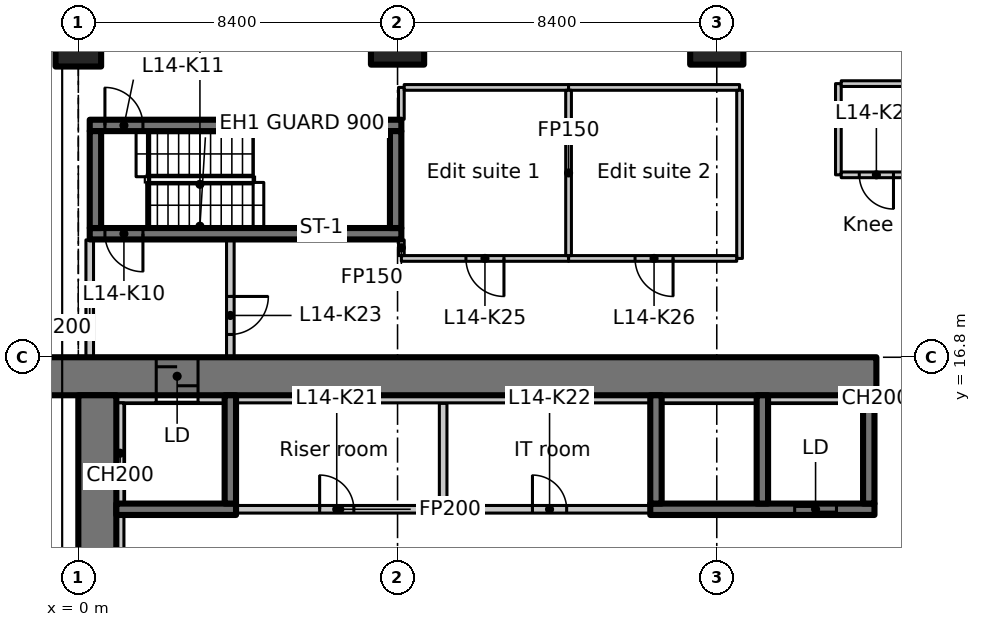
"""IFC4 building model, lengths in metres.
Left out: names, types, materials, properties, quantities, classifications, styles, units other than length and angle.
Written with IfcOpenShell. Run it as: python <this file> out.ifc"""

import sys

from ifc_helpers import new_model, si_unit, direction, frame, frame_2d, origin, origin_2d, place, context, subcontext, project, spatial, rectangle, extrude, element, fill, save


model = new_model("IFC4")
c1 = context("Model", 3, precision=1e-05, world=origin(), true_north=direction((0.0, 1.0)))
c2 = subcontext(c1, "Body", "Model", "MODEL_VIEW")
j1 = project(units=[si_unit("LENGTHUNIT", "METRE"), si_unit("PLANEANGLEUNIT", "RADIAN")], contexts=[c1])
p1 = place(None, origin())
s1 = spatial("IfcSite", under=j1, at=p1, CompositionType="ELEMENT")
p2 = place(p1, origin())
s2 = spatial("IfcBuilding", under=s1, at=p2, CompositionType="ELEMENT")
p3 = place(p2, frame((0.0, 0.0, 65.3)))
s3 = spatial("IfcBuildingStorey", under=s2, at=p3, CompositionType="ELEMENT", Elevation=65.3)
p4 = place(p3, frame((0.0, 25.2, 0.0), z_axis=(0.0, 0.0, 1.0), x_axis=(1.0, 0.0, 0.0)))
e1 = element("IfcColumn", 1, at=p4, inside=s3, PredefinedType="COLUMN", context=c2, shape_type="SweptSolid", body=[
    extrude(rectangle(XDim=1.2, YDim=1.5, at=origin_2d()), origin(), (0.0, 0.0, 1.0), 3.35),
])
for number, where, z_axis, x_axis in (
    (2, (8.4, 25.2, 0.0), (0.0, 0.0, 1.0), (1.0, 0.0, 0.0)),
    (3, (16.8, 25.2, 0.0), (0.0, 0.0, 1.0), (1.0, 0.0, 0.0)),
):
    element("IfcColumn", number, at=place(p3, frame(where, z_axis=z_axis, x_axis=x_axis)), inside=s3, PredefinedType="COLUMN", context=c2, shape_type="SweptSolid", body=[
        extrude(rectangle(XDim=1.4, YDim=1.4, at=origin_2d()), origin(), (0.0, 0.0, 1.0), 3.35),
    ])
p5 = place(p3, frame((-1.1, 16.3, 0.0), z_axis=(0.0, 0.0, 1.0), x_axis=(1.0, 0.0, 0.0)))
e4 = element("IfcWall", 4, at=p5, inside=s3, PredefinedType="SHEAR", context=c2, shape_type="SweptSolid", body=[
    extrude(rectangle(XDim=22.1, YDim=1.0, at=frame_2d((11.05, 0.0))), origin(), (0.0, 0.0, 1.0), 3.35),
])
p6 = place(p5, frame((3.15, 0.0, 0.0)))
e5 = element("IfcOpeningElement", 5, at=p6, cuts=e4, PredefinedType="OPENING", context=c2, shape_type="SweptSolid", body=[
    extrude(rectangle(XDim=1.1, YDim=2.3, at=frame_2d((0.55, 1.15))), frame((0.0, 0.51, 0.0), z_axis=(0.0, -1.0, 0.0), x_axis=(1.0, 0.0, 0.0)), (0.0, 0.0, 1.0), 1.02),
])
p7 = place(p3, frame((0.5, 6.936, 0.0), z_axis=(0.0, 0.0, 1.0), x_axis=(0.0, 1.0, 0.0)))
e6 = element("IfcWall", 6, at=p7, inside=s3, PredefinedType="SHEAR", context=c2, shape_type="SweptSolid", body=[
    extrude(rectangle(XDim=8.864, YDim=1.0, at=frame_2d((4.432, 0.0))), origin(), (0.0, 0.0, 1.0), 3.35),
])
p8 = place(p3, frame((1.0, 15.7, 0.0), z_axis=(0.0, 0.0, 1.0), x_axis=(1.0, 0.0, 0.0)))
e7 = element("IfcWall", 7, at=p8, inside=s3, PredefinedType="PARTITIONING", context=c2, shape_type="SweptSolid", body=[
    extrude(rectangle(XDim=1.05, YDim=0.2, at=frame_2d((0.525, 0.0))), origin(), (0.0, 0.0, 1.0), 3.35),
])
p9 = place(p3, frame((1.0, 12.8, 0.0), z_axis=(0.0, 0.0, 1.0), x_axis=(1.0, 0.0, 0.0)))
e8 = element("IfcWall", 8, at=p9, inside=s3, PredefinedType="SHEAR", context=c2, shape_type="SweptSolid", body=[
    extrude(rectangle(XDim=3.15, YDim=0.3, at=frame_2d((1.575, 0.0))), origin(), (0.0, 0.0, 1.0), 3.35),
])
p10 = place(p3, frame((4.0, 12.95, 0.0), z_axis=(0.0, 0.0, 1.0), x_axis=(0.0, 1.0, 0.0)))
e9 = element("IfcWall", 9, at=p10, inside=s3, PredefinedType="SHEAR", context=c2, shape_type="SweptSolid", body=[
    extrude(rectangle(XDim=2.85, YDim=0.3, at=frame_2d((1.425, 0.0))), origin(), (0.0, 0.0, 1.0), 3.35),
])
p11 = place(p3, frame((15.05, 12.8, 0.0), z_axis=(0.0, 0.0, 1.0), x_axis=(1.0, 0.0, 0.0)))
e10 = element("IfcWall", 10, at=p11, inside=s3, PredefinedType="SHEAR", context=c2, shape_type="SweptSolid", body=[
    extrude(rectangle(XDim=5.9, YDim=0.3, at=frame_2d((2.95, 0.0))), origin(), (0.0, 0.0, 1.0), 3.35),
])
p12 = place(p11, frame((3.8, 0.0, 0.0)))
e11 = element("IfcOpeningElement", 11, at=p12, cuts=e10, PredefinedType="OPENING", context=c2, shape_type="SweptSolid", body=[
    extrude(rectangle(XDim=1.1, YDim=2.3, at=frame_2d((0.55, 1.15))), frame((0.0, 0.16, 0.0), z_axis=(0.0, -1.0, 0.0), x_axis=(1.0, 0.0, 0.0)), (0.0, 0.0, 1.0), 0.32),
])
for number, where, z_axis, x_axis in (
    (12, (15.2, 12.95, 0.0), (0.0, 0.0, 1.0), (0.0, 1.0, 0.0)),
    (13, (18.0, 12.95, 0.0), (0.0, 0.0, 1.0), (0.0, 1.0, 0.0)),
    (14, (20.8, 12.95, 0.0), (0.0, 0.0, 1.0), (0.0, 1.0, 0.0)),
):
    element("IfcWall", number, at=place(p3, frame(where, z_axis=z_axis, x_axis=x_axis)), inside=s3, PredefinedType="SHEAR", context=c2, shape_type="SweptSolid", body=[
        extrude(rectangle(XDim=2.85, YDim=0.3, at=frame_2d((1.425, 0.0))), origin(), (0.0, 0.0, 1.0), 3.35),
    ])
p13 = place(p3, frame((8.5, 20.05, 0.0), z_axis=(0.0, 0.0, 1.0), x_axis=(-1.0, 0.0, 0.0)))
e15 = element("IfcWall", 15, at=p13, inside=s3, PredefinedType="SHEAR", context=c2, shape_type="SweptSolid", body=[
    extrude(rectangle(XDim=8.2, YDim=0.3, at=frame_2d((4.1, 0.0))), origin(), (0.0, 0.0, 1.0), 3.35),
])
p14 = place(p13, frame((6.8, 0.0, 0.0)))
e16 = element("IfcOpeningElement", 16, at=p14, cuts=e15, PredefinedType="OPENING", context=c2, shape_type="SweptSolid", body=[
    extrude(rectangle(XDim=1.0, YDim=2.1, at=frame_2d((0.5, 1.05))), frame((0.0, 0.16, 0.0), z_axis=(0.0, -1.0, 0.0), x_axis=(1.0, 0.0, 0.0)), (0.0, 0.0, 1.0), 0.32),
])
p15 = place(p3, frame((0.3, 22.9, 0.0), z_axis=(0.0, 0.0, 1.0), x_axis=(1.0, 0.0, 0.0)))
e17 = element("IfcWall", 17, at=p15, inside=s3, PredefinedType="SHEAR", context=c2, shape_type="SweptSolid", body=[
    extrude(rectangle(XDim=8.2, YDim=0.3, at=frame_2d((4.1, 0.0))), origin(), (0.0, 0.0, 1.0), 3.35),
])
p16 = place(p15, frame((0.4, 0.0, 0.0)))
e18 = element("IfcOpeningElement", 18, at=p16, cuts=e17, PredefinedType="OPENING", context=c2, shape_type="SweptSolid", body=[
    extrude(rectangle(XDim=1.0, YDim=2.1, at=frame_2d((0.5, 1.05))), frame((0.0, 0.16, 0.0), z_axis=(0.0, -1.0, 0.0), x_axis=(1.0, 0.0, 0.0)), (0.0, 0.0, 1.0), 0.32),
])
for number, where, z_axis, x_axis in (
    (19, (0.45, 20.2, 0.0), (0.0, 0.0, 1.0), (0.0, 1.0, 0.0)),
    (20, (8.35, 20.2, 0.0), (0.0, 0.0, 1.0), (0.0, 1.0, 0.0)),
):
    element("IfcWall", number, at=place(p3, frame(where, z_axis=z_axis, x_axis=x_axis)), inside=s3, PredefinedType="SHEAR", context=c2, shape_type="SweptSolid", body=[
        extrude(rectangle(XDim=2.55, YDim=0.3, at=frame_2d((1.275, 0.0))), origin(), (0.0, 0.0, 1.0), 3.35),
    ])
p17 = place(p3, frame((0.3, 16.812, 0.0), z_axis=(0.0, 0.0, 1.0), x_axis=(0.0, 1.0, 0.0)))
e21 = element("IfcWall", 21, at=p17, inside=s3, PredefinedType="PARTITIONING", context=c2, shape_type="SweptSolid", body=[
    extrude(rectangle(XDim=3.076, YDim=0.2, at=frame_2d((1.538, 0.0))), origin(), (0.0, 0.0, 1.0), 2.98),
])
p18 = place(p3, frame((4.0, 19.888, 0.0), z_axis=(0.0, 0.0, 1.0), x_axis=(0.0, -1.0, 0.0)))
e22 = element("IfcWall", 22, at=p18, inside=s3, PredefinedType="PARTITIONING", context=c2, shape_type="SweptSolid", body=[
    extrude(rectangle(XDim=3.076, YDim=0.2, at=frame_2d((1.538, 0.0))), origin(), (0.0, 0.0, 1.0), 3.35),
])
p19 = place(p18, frame((1.488, 0.0, 0.0)))
e23 = element("IfcOpeningElement", 23, at=p19, cuts=e22, PredefinedType="OPENING", context=c2, shape_type="SweptSolid", body=[
    extrude(rectangle(XDim=1.0, YDim=2.1, at=frame_2d((0.5, 1.05))), frame((0.0, 0.11, 0.0), z_axis=(0.0, -1.0, 0.0), x_axis=(1.0, 0.0, 0.0)), (0.0, 0.0, 1.0), 0.22),
])
p20 = place(p3, frame((4.162, 12.8, 0.0), z_axis=(0.0, 0.0, 1.0), x_axis=(1.0, 0.0, 0.0)))
e24 = element("IfcWall", 24, at=p20, inside=s3, PredefinedType="PARTITIONING", context=c2, shape_type="SweptSolid", body=[
    extrude(rectangle(XDim=5.438, YDim=0.2, at=frame_2d((2.719, 0.0))), origin(), (0.0, 0.0, 1.0), 3.35),
])
p21 = place(p20, frame((2.188, 0.0, 0.0)))
e25 = element("IfcOpeningElement", 25, at=p21, cuts=e24, PredefinedType="OPENING", context=c2, shape_type="SweptSolid", body=[
    extrude(rectangle(XDim=0.9, YDim=2.1, at=frame_2d((0.45, 1.05))), frame((0.0, 0.11, 0.0), z_axis=(0.0, -1.0, 0.0), x_axis=(1.0, 0.0, 0.0)), (0.0, 0.0, 1.0), 0.22),
])
p22 = place(p3, frame((9.6, 12.8, 0.0), z_axis=(0.0, 0.0, 1.0), x_axis=(1.0, 0.0, 0.0)))
e26 = element("IfcWall", 26, at=p22, inside=s3, PredefinedType="PARTITIONING", context=c2, shape_type="SweptSolid", body=[
    extrude(rectangle(XDim=5.438, YDim=0.2, at=frame_2d((2.719, 0.0))), origin(), (0.0, 0.0, 1.0), 3.35),
])
p23 = place(p22, frame((2.35, 0.0, 0.0)))
e27 = element("IfcOpeningElement", 27, at=p23, cuts=e26, PredefinedType="OPENING", context=c2, shape_type="SweptSolid", body=[
    extrude(rectangle(XDim=0.9, YDim=2.1, at=frame_2d((0.45, 1.05))), frame((0.0, 0.11, 0.0), z_axis=(0.0, -1.0, 0.0), x_axis=(1.0, 0.0, 0.0)), (0.0, 0.0, 1.0), 0.22),
])
p24 = place(p3, frame((9.6, 15.588, 0.0), z_axis=(0.0, 0.0, 1.0), x_axis=(0.0, -1.0, 0.0)))
e28 = element("IfcWall", 28, at=p24, inside=s3, PredefinedType="PARTITIONING", context=c2, shape_type="SweptSolid", body=[
    extrude(rectangle(XDim=2.688, YDim=0.2, at=frame_2d((1.344, 0.0))), origin(), (0.0, 0.0, 1.0), 3.35),
])
p25 = place(p3, frame((12.9, 19.4, 0.0), z_axis=(0.0, 0.0, 1.0), x_axis=(-1.0, 0.0, 0.0)))
e29 = element("IfcWall", 29, at=p25, inside=s3, PredefinedType="PARTITIONING", context=c2, shape_type="SweptSolid", body=[
    extrude(rectangle(XDim=4.4, YDim=0.15, at=frame_2d((2.2, 0.0))), origin(), (0.0, 0.0, 1.0), 3.35),
])
p26 = place(p25, frame((1.7, 0.0, 0.0)))
e30 = element("IfcOpeningElement", 30, at=p26, cuts=e29, PredefinedType="OPENING", context=c2, shape_type="SweptSolid", body=[
    extrude(rectangle(XDim=1.0, YDim=2.1, at=frame_2d((0.5, 1.05))), frame((0.0, 0.085, 0.0), z_axis=(0.0, -1.0, 0.0), x_axis=(1.0, 0.0, 0.0)), (0.0, 0.0, 1.0), 0.17),
])
p27 = place(p3, frame((8.5, 19.475, 0.0), z_axis=(0.0, 0.0, 1.0), x_axis=(0.0, 1.0, 0.0)))
e31 = element("IfcWall", 31, at=p27, inside=s3, PredefinedType="PARTITIONING", context=c2, shape_type="SweptSolid", body=[
    extrude(rectangle(XDim=0.413, YDim=0.15, at=frame_2d((0.207, 0.0))), origin(), (0.0, 0.0, 1.0), 3.35),
])
p28 = place(p3, frame((8.5, 23.062, 0.0), z_axis=(0.0, 0.0, 1.0), x_axis=(0.0, 1.0, 0.0)))
e32 = element("IfcWall", 32, at=p28, inside=s3, PredefinedType="PARTITIONING", context=c2, shape_type="SweptSolid", body=[
    extrude(rectangle(XDim=0.838, YDim=0.15, at=frame_2d((0.419, 0.0))), origin(), (0.0, 0.0, 1.0), 3.35),
])
p29 = place(p3, frame((8.575, 23.9, 0.0), z_axis=(0.0, 0.0, 1.0), x_axis=(1.0, 0.0, 0.0)))
e33 = element("IfcWall", 33, at=p29, inside=s3, PredefinedType="PARTITIONING", context=c2, shape_type="SweptSolid", body=[
    extrude(rectangle(XDim=4.325, YDim=0.15, at=frame_2d((2.163, 0.0))), origin(), (0.0, 0.0, 1.0), 3.35),
])
p30 = place(p3, frame((12.9, 23.9, 0.0), z_axis=(0.0, 0.0, 1.0), x_axis=(1.0, 0.0, 0.0)))
e34 = element("IfcWall", 34, at=p30, inside=s3, PredefinedType="PARTITIONING", context=c2, shape_type="SweptSolid", body=[
    extrude(rectangle(XDim=4.5, YDim=0.15, at=frame_2d((2.25, 0.0))), origin(), (0.0, 0.0, 1.0), 3.35),
])
p31 = place(p3, frame((17.4, 23.825, 0.0), z_axis=(0.0, 0.0, 1.0), x_axis=(0.0, -1.0, 0.0)))
e35 = element("IfcWall", 35, at=p31, inside=s3, PredefinedType="PARTITIONING", context=c2, shape_type="SweptSolid", body=[
    extrude(rectangle(XDim=4.425, YDim=0.15, at=frame_2d((2.212, 0.0))), origin(), (0.0, 0.0, 1.0), 3.35),
])
p32 = place(p3, frame((17.325, 19.4, 0.0), z_axis=(0.0, 0.0, 1.0), x_axis=(-1.0, 0.0, 0.0)))
e36 = element("IfcWall", 36, at=p32, inside=s3, PredefinedType="PARTITIONING", context=c2, shape_type="SweptSolid", body=[
    extrude(rectangle(XDim=4.425, YDim=0.15, at=frame_2d((2.212, 0.0))), origin(), (0.0, 0.0, 1.0), 3.35),
])
p33 = place(p32, frame((1.675, 0.0, 0.0)))
e37 = element("IfcOpeningElement", 37, at=p33, cuts=e36, PredefinedType="OPENING", context=c2, shape_type="SweptSolid", body=[
    extrude(rectangle(XDim=1.0, YDim=2.1, at=frame_2d((0.5, 1.05))), frame((0.0, 0.085, 0.0), z_axis=(0.0, -1.0, 0.0), x_axis=(1.0, 0.0, 0.0)), (0.0, 0.0, 1.0), 0.17),
])
p34 = place(p3, frame((12.9, 23.825, 0.0), z_axis=(0.0, 0.0, 1.0), x_axis=(0.0, -1.0, 0.0)))
e38 = element("IfcWall", 38, at=p34, inside=s3, PredefinedType="PARTITIONING", context=c2, shape_type="SweptSolid", body=[
    extrude(rectangle(XDim=4.35, YDim=0.15, at=frame_2d((2.175, 0.0))), origin(), (0.0, 0.0, 1.0), 3.35),
])
p35 = place(p3, frame((20.0, 21.6, 0.0), z_axis=(0.0, 0.0, 1.0), x_axis=(0.0, 1.0, 0.0)))
e39 = element("IfcWall", 39, at=p35, inside=s3, PredefinedType="PARTITIONING", context=c2, shape_type="SweptSolid", body=[
    extrude(rectangle(XDim=2.4, YDim=0.15, at=frame_2d((1.2, 0.0))), origin(), (0.0, 0.0, 1.0), 3.35),
])
p36 = place(p3, frame((20.075, 24.0, 0.0), z_axis=(0.0, 0.0, 1.0), x_axis=(1.0, 0.0, 0.0)))
e40 = element("IfcWall", 40, at=p36, inside=s3, PredefinedType="PARTITIONING", context=c2, shape_type="SweptSolid", body=[
    extrude(rectangle(XDim=1.925, YDim=0.15, at=frame_2d((0.962, 0.0))), origin(), (0.0, 0.0, 1.0), 3.35),
])
p37 = place(p3, frame((21.925, 21.6, 0.0), z_axis=(0.0, 0.0, 1.0), x_axis=(-1.0, 0.0, 0.0)))
e41 = element("IfcWall", 41, at=p37, inside=s3, PredefinedType="PARTITIONING", context=c2, shape_type="SweptSolid", body=[
    extrude(rectangle(XDim=1.85, YDim=0.15, at=frame_2d((0.925, 0.0))), origin(), (0.0, 0.0, 1.0), 3.35),
])
p38 = place(p37, frame((0.475, 0.0, 0.0)))
e42 = element("IfcOpeningElement", 42, at=p38, cuts=e41, PredefinedType="OPENING", context=c2, shape_type="SweptSolid", body=[
    extrude(rectangle(XDim=0.9, YDim=2.1, at=frame_2d((0.45, 1.05))), frame((0.0, 0.085, 0.0), z_axis=(0.0, -1.0, 0.0), x_axis=(1.0, 0.0, 0.0)), (0.0, 0.0, 1.0), 0.17),
])
p39 = place(p3, frame((1.1, 9.75, 0.0), z_axis=(0.0, 0.0, 1.0), x_axis=(0.0, 1.0, 0.0)))
e43 = element("IfcWall", 43, at=p39, inside=s3, PredefinedType="PARTITIONING", context=c2, shape_type="SweptSolid", body=[
    extrude(rectangle(XDim=2.9, YDim=0.2, at=frame_2d((1.45, 0.0))), origin(), (0.0, 0.0, 1.0), 3.35),
])
p40 = place(p3, frame((1.1, 12.95, 0.0), z_axis=(0.0, 0.0, 1.0), x_axis=(0.0, 1.0, 0.0)))
e44 = element("IfcWall", 44, at=p40, inside=s3, PredefinedType="PARTITIONING", context=c2, shape_type="SweptSolid", body=[
    extrude(rectangle(XDim=2.65, YDim=0.2, at=frame_2d((1.325, 0.0))), origin(), (0.0, 0.0, 1.0), 3.35),
])
p41 = place(p3, frame((3.15, 15.7, 0.0), z_axis=(0.0, 0.0, 1.0), x_axis=(1.0, 0.0, 0.0)))
e45 = element("IfcWall", 45, at=p41, inside=s3, PredefinedType="PARTITIONING", context=c2, shape_type="SweptSolid", body=[
    extrude(rectangle(XDim=0.7, YDim=0.2, at=frame_2d((0.35, 0.0))), origin(), (0.0, 0.0, 1.0), 3.35),
])
p42 = place(p3, frame((4.15, 15.7, 0.0), z_axis=(0.0, 0.0, 1.0), x_axis=(1.0, 0.0, 0.0)))
e46 = element("IfcWall", 46, at=p42, inside=s3, PredefinedType="PARTITIONING", context=c2, shape_type="SweptSolid", body=[
    extrude(rectangle(XDim=10.9, YDim=0.2, at=frame_2d((5.45, 0.0))), origin(), (0.0, 0.0, 1.0), 3.35),
])
for number, where, z_axis, x_axis in (
    (47, (15.35, 15.7, 0.0), (0.0, 0.0, 1.0), (1.0, 0.0, 0.0)),
    (48, (18.15, 15.7, 0.0), (0.0, 0.0, 1.0), (1.0, 0.0, 0.0)),
):
    element("IfcWall", number, at=place(p3, frame(where, z_axis=z_axis, x_axis=x_axis)), inside=s3, PredefinedType="PARTITIONING", context=c2, shape_type="SweptSolid", body=[
        extrude(rectangle(XDim=2.5, YDim=0.2, at=frame_2d((1.25, 0.0))), origin(), (0.0, 0.0, 1.0), 3.35),
    ])
p43 = place(p3, frame((20.95, 15.7, 0.0), z_axis=(0.0, 0.0, 1.0), x_axis=(1.0, 0.0, 0.0)))
e49 = element("IfcWall", 49, at=p43, inside=s3, PredefinedType="PARTITIONING", context=c2, shape_type="SweptSolid", body=[
    extrude(rectangle(XDim=0.05, YDim=0.2, at=frame_2d((0.025, 0.0))), origin(), (0.0, 0.0, 1.0), 3.35),
])
p44 = place(p6, origin())
e50 = element("IfcDoor", 50, at=p44, inside=s3, OperationType="SLIDING_TO_LEFT", PredefinedType="DOOR", context=c2, shape_type="SweptSolid", body=[
    extrude(rectangle(XDim=1.1, YDim=2.3, at=frame_2d((0.55, 1.15))), frame((0.0, 0.025, 0.0), z_axis=(0.0, -1.0, 0.0), x_axis=(1.0, 0.0, 0.0)), (0.0, 0.0, 1.0), 0.05),
])
fill(e5, e50)
p45 = place(p12, origin())
e51 = element("IfcDoor", 51, at=p45, inside=s3, OperationType="SLIDING_TO_LEFT", PredefinedType="DOOR", context=c2, shape_type="SweptSolid", body=[
    extrude(rectangle(XDim=1.1, YDim=2.3, at=frame_2d((0.55, 1.15))), frame((0.0, 0.025, 0.0), z_axis=(0.0, -1.0, 0.0), x_axis=(1.0, 0.0, 0.0)), (0.0, 0.0, 1.0), 0.05),
])
fill(e11, e51)
p46 = place(p14, origin())
e52 = element("IfcDoor", 52, at=p46, inside=s3, OperationType="SINGLE_SWING_LEFT", PredefinedType="DOOR", context=c2, shape_type="SweptSolid", body=[
    extrude(rectangle(XDim=1.0, YDim=2.1, at=frame_2d((0.5, 1.05))), frame((0.0, 0.025, 0.0), z_axis=(0.0, -1.0, 0.0), x_axis=(1.0, 0.0, 0.0)), (0.0, 0.0, 1.0), 0.05),
])
fill(e16, e52)
p47 = place(p16, origin())
e53 = element("IfcDoor", 53, at=p47, inside=s3, OperationType="SINGLE_SWING_RIGHT", PredefinedType="DOOR", context=c2, shape_type="SweptSolid", body=[
    extrude(rectangle(XDim=1.0, YDim=2.1, at=frame_2d((0.5, 1.05))), frame((0.0, 0.025, 0.0), z_axis=(0.0, -1.0, 0.0), x_axis=(1.0, 0.0, 0.0)), (0.0, 0.0, 1.0), 0.05),
])
fill(e18, e53)
p48 = place(p21, origin())
e54 = element("IfcDoor", 54, at=p48, inside=s3, OperationType="SINGLE_SWING_RIGHT", PredefinedType="DOOR", context=c2, shape_type="SweptSolid", body=[
    extrude(rectangle(XDim=0.9, YDim=2.1, at=frame_2d((0.45, 1.05))), frame((0.0, 0.025, 0.0), z_axis=(0.0, -1.0, 0.0), x_axis=(1.0, 0.0, 0.0)), (0.0, 0.0, 1.0), 0.05),
])
fill(e25, e54)
p49 = place(p23, origin())
e55 = element("IfcDoor", 55, at=p49, inside=s3, OperationType="SINGLE_SWING_LEFT", PredefinedType="DOOR", context=c2, shape_type="SweptSolid", body=[
    extrude(rectangle(XDim=0.9, YDim=2.1, at=frame_2d((0.45, 1.05))), frame((0.0, 0.025, 0.0), z_axis=(0.0, -1.0, 0.0), x_axis=(1.0, 0.0, 0.0)), (0.0, 0.0, 1.0), 0.05),
])
fill(e27, e55)
p50 = place(p19, origin())
e56 = element("IfcDoor", 56, at=p50, inside=s3, OperationType="SINGLE_SWING_RIGHT", PredefinedType="DOOR", context=c2, shape_type="SweptSolid", body=[
    extrude(rectangle(XDim=1.0, YDim=2.1, at=frame_2d((0.5, 1.05))), frame((0.0, 0.025, 0.0), z_axis=(0.0, -1.0, 0.0), x_axis=(1.0, 0.0, 0.0)), (0.0, 0.0, 1.0), 0.05),
])
fill(e23, e56)
p51 = place(p38, origin())
e57 = element("IfcDoor", 57, at=p51, inside=s3, OperationType="SINGLE_SWING_LEFT", PredefinedType="DOOR", context=c2, shape_type="SweptSolid", body=[
    extrude(rectangle(XDim=0.9, YDim=2.1, at=frame_2d((0.45, 1.05))), frame((0.0, 0.025, 0.0), z_axis=(0.0, -1.0, 0.0), x_axis=(1.0, 0.0, 0.0)), (0.0, 0.0, 1.0), 0.05),
])
fill(e42, e57)
p52 = place(p26, origin())
e58 = element("IfcDoor", 58, at=p52, inside=s3, OperationType="SINGLE_SWING_RIGHT", PredefinedType="DOOR", context=c2, shape_type="SweptSolid", body=[
    extrude(rectangle(XDim=1.0, YDim=2.1, at=frame_2d((0.5, 1.05))), frame((0.0, 0.025, 0.0), z_axis=(0.0, -1.0, 0.0), x_axis=(1.0, 0.0, 0.0)), (0.0, 0.0, 1.0), 0.05),
])
fill(e30, e58)
p53 = place(p33, origin())
e59 = element("IfcDoor", 59, at=p53, inside=s3, OperationType="SINGLE_SWING_LEFT", PredefinedType="DOOR", context=c2, shape_type="SweptSolid", body=[
    extrude(rectangle(XDim=1.0, YDim=2.1, at=frame_2d((0.5, 1.05))), frame((0.0, 0.025, 0.0), z_axis=(0.0, -1.0, 0.0), x_axis=(1.0, 0.0, 0.0)), (0.0, 0.0, 1.0), 0.05),
])
fill(e37, e59)
save(model, sys.argv[1])
